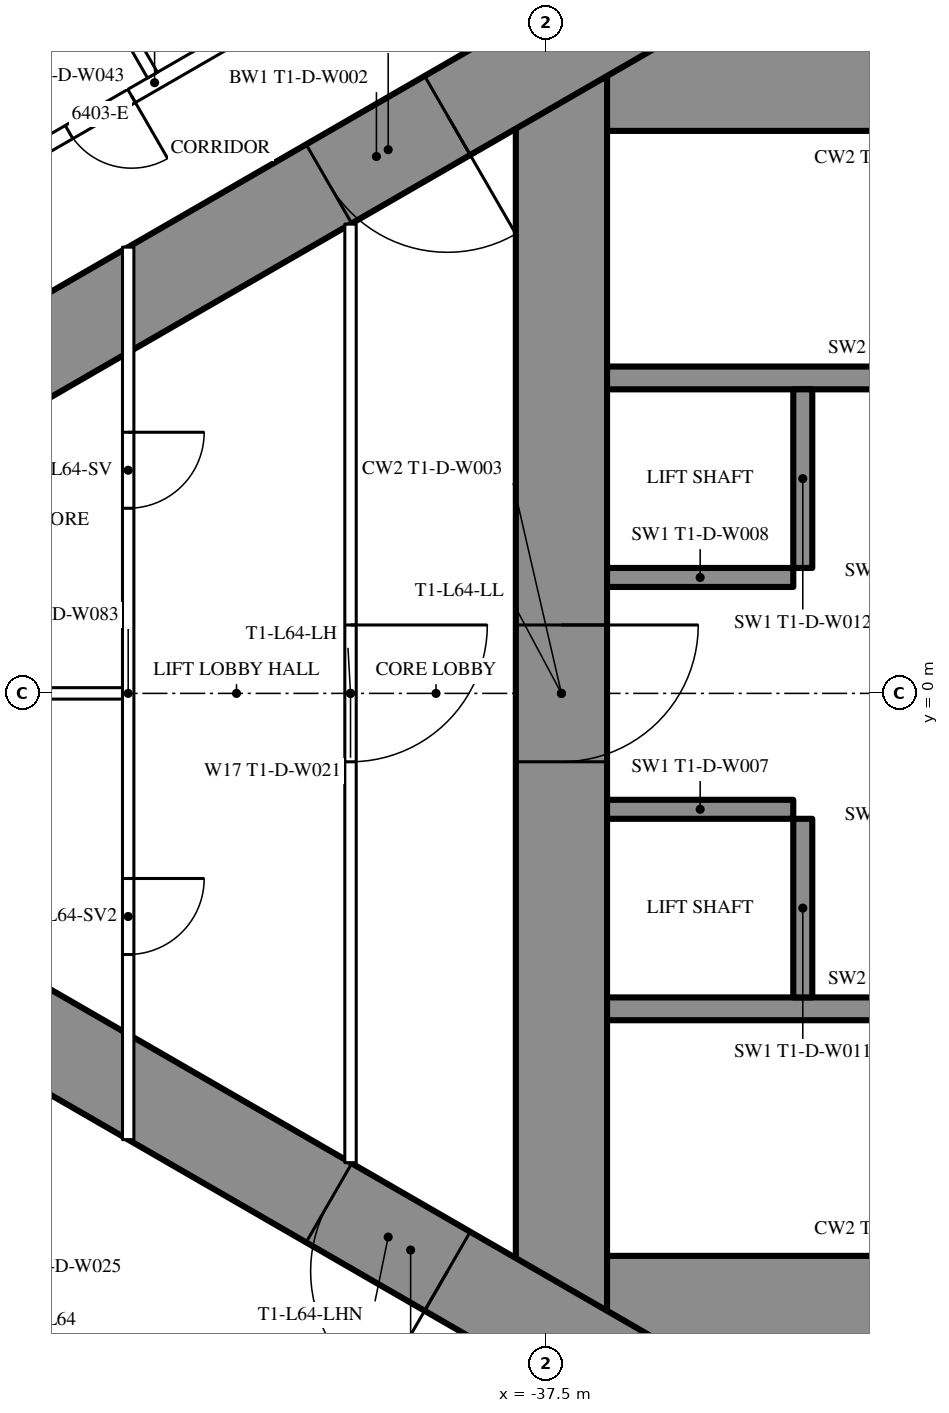
"""IFC4 building model, lengths in metres.
Left out: names, types, materials, properties, quantities, classifications, styles, units other than length and angle.
Written with IfcOpenShell. Run it as: python <this file> out.ifc"""

import sys

from ifc_helpers import new_model, si_unit, direction, frame, frame_2d, origin, place, context, subcontext, project, spatial, rectangle, extrude, element, fill, save


model = new_model("IFC4")
c1 = context("Model", 3, precision=1e-05, world=origin(), true_north=direction((0.0, 1.0)))
c2 = subcontext(c1, "Body", "Model", "MODEL_VIEW")
j1 = project(units=[si_unit("LENGTHUNIT", "METRE"), si_unit("PLANEANGLEUNIT", "RADIAN")], contexts=[c1])
p1 = place(None, origin())
s1 = spatial("IfcSite", under=j1, at=p1, CompositionType="ELEMENT")
p2 = place(p1, origin())
s2 = spatial("IfcBuilding", under=s1, at=p2, CompositionType="ELEMENT")
p3 = place(p2, frame((0.0, 0.0, 240.5)))
s3 = spatial("IfcBuildingStorey", under=s2, at=p3, CompositionType="ELEMENT", Elevation=240.5)
p4 = place(p3, frame((-37.3, 8.6, 0.0), z_axis=(0.0, 0.0, 1.0), x_axis=(0.0, -1.0, 0.0)))
e1 = element("IfcWall", 1, at=p4, inside=s3, PredefinedType="SHEAR", context=c2, shape_type="SweptSolid", body=[
    extrude(rectangle(XDim=17.2, YDim=1.2, at=frame_2d((8.6, 0.0))), origin(), (0.0, 0.0, 1.0), 3.6),
])
p5 = place(p4, frame((7.7, 0.0, 0.0)))
e2 = element("IfcOpeningElement", 2, at=p5, cuts=e1, PredefinedType="OPENING", context=c2, shape_type="SweptSolid", body=[
    extrude(rectangle(XDim=1.8, YDim=2.2, at=frame_2d((0.9, 1.1))), frame((0.0, 0.61, 0.0), z_axis=(0.0, -1.0, 0.0), x_axis=(1.0, 0.0, 0.0)), (0.0, 0.0, 1.0), 1.22),
])
p6 = place(p3, frame((-28.3, 8.0, 0.0), z_axis=(0.0, 0.0, 1.0), x_axis=(-1.0, 0.0, 0.0)))
e3 = element("IfcWall", 3, at=p6, inside=s3, PredefinedType="SHEAR", context=c2, shape_type="SweptSolid", body=[
    extrude(rectangle(XDim=8.4, YDim=1.2, at=frame_2d((4.2, 0.0))), origin(), (0.0, 0.0, 1.0), 3.6),
])
p7 = place(p6, frame((0.25, 0.0, 0.0)))
e4 = element("IfcOpeningElement", 4, at=p7, cuts=e3, PredefinedType="OPENING", context=c2, shape_type="SweptSolid", body=[
    extrude(rectangle(XDim=1.0, YDim=2.2, at=frame_2d((0.5, 1.1))), frame((0.0, 0.61, 0.0), z_axis=(0.0, -1.0, 0.0), x_axis=(1.0, 0.0, 0.0)), (0.0, 0.0, 1.0), 1.22),
])
p8 = place(p3, frame((-28.3, -8.0, 0.0), z_axis=(0.0, 0.0, 1.0), x_axis=(-1.0, 0.0, 0.0)))
e5 = element("IfcWall", 5, at=p8, inside=s3, PredefinedType="SHEAR", context=c2, shape_type="SweptSolid", body=[
    extrude(rectangle(XDim=8.4, YDim=1.2, at=frame_2d((4.2, 0.0))), origin(), (0.0, 0.0, 1.0), 3.6),
])
p9 = place(p8, frame((0.25, 0.0, 0.0)))
e6 = element("IfcOpeningElement", 6, at=p9, cuts=e5, PredefinedType="OPENING", context=c2, shape_type="SweptSolid", body=[
    extrude(rectangle(XDim=1.0, YDim=2.2, at=frame_2d((0.5, 1.1))), frame((0.0, 0.61, 0.0), z_axis=(0.0, -1.0, 0.0), x_axis=(1.0, 0.0, 0.0)), (0.0, 0.0, 1.0), 1.22),
])
for number, where, z_axis, x_axis in (
    (7, (-28.3, 4.15, 0.0), (0.0, 0.0, 1.0), (-1.0, 0.0, 0.0)),
    (8, (-28.3, -4.15, 0.0), (0.0, 0.0, 1.0), (-1.0, 0.0, 0.0)),
):
    element("IfcWall", number, at=place(p3, frame(where, z_axis=z_axis, x_axis=x_axis)), inside=s3, PredefinedType="SHEAR", context=c2, shape_type="SweptSolid", body=[
        extrude(rectangle(XDim=8.4, YDim=0.3, at=frame_2d((4.2, 0.0))), origin(), (0.0, 0.0, 1.0), 3.6),
    ])
p10 = place(p3, frame((-34.125, 4.0, 0.0), z_axis=(0.0, 0.0, 1.0), x_axis=(0.0, -1.0, 0.0)))
e9 = element("IfcWall", 9, at=p10, inside=s3, PredefinedType="SHEAR", context=c2, shape_type="SweptSolid", body=[
    extrude(rectangle(XDim=2.35, YDim=0.25, at=frame_2d((1.175, 0.0))), origin(), (0.0, 0.0, 1.0), 3.6),
])
p11 = place(p3, frame((-34.25, 1.525, 0.0), z_axis=(0.0, 0.0, 1.0), x_axis=(-1.0, 0.0, 0.0)))
e10 = element("IfcWall", 10, at=p11, inside=s3, PredefinedType="SHEAR", context=c2, shape_type="SweptSolid", body=[
    extrude(rectangle(XDim=2.45, YDim=0.25, at=frame_2d((1.225, 0.0))), origin(), (0.0, 0.0, 1.0), 3.6),
])
p12 = place(p3, frame((-34.125, -1.65, 0.0), z_axis=(0.0, 0.0, 1.0), x_axis=(0.0, -1.0, 0.0)))
e11 = element("IfcWall", 11, at=p12, inside=s3, PredefinedType="SHEAR", context=c2, shape_type="SweptSolid", body=[
    extrude(rectangle(XDim=2.35, YDim=0.25, at=frame_2d((1.175, 0.0))), origin(), (0.0, 0.0, 1.0), 3.6),
])
p13 = place(p3, frame((-34.25, -1.525, 0.0), z_axis=(0.0, 0.0, 1.0), x_axis=(-1.0, 0.0, 0.0)))
e12 = element("IfcWall", 12, at=p13, inside=s3, PredefinedType="SHEAR", context=c2, shape_type="SweptSolid", body=[
    extrude(rectangle(XDim=2.45, YDim=0.25, at=frame_2d((1.225, 0.0))), origin(), (0.0, 0.0, 1.0), 3.6),
])
p14 = place(p3, frame((-27.2, 14.3, 0.0), z_axis=(0.0, 0.0, 1.0), x_axis=(-0.866026593062, -0.499997940104, 0.0)))
e13 = element("IfcWall", 13, at=p14, inside=s3, PredefinedType="SHEAR", context=c2, shape_type="SweptSolid", body=[
    extrude(rectangle(XDim=28.946, YDim=1.2, at=frame_2d((14.473, 0.0))), origin(), (0.0, 0.0, 1.0), 3.6),
])
p15 = place(p14, frame((4.6, 0.0, 0.0)))
e14 = element("IfcOpeningElement", 14, at=p15, cuts=e13, PredefinedType="OPENING", context=c2, shape_type="SweptSolid", body=[
    extrude(rectangle(XDim=1.0, YDim=2.2, at=frame_2d((0.5, 1.1))), frame((0.0, 0.61, 0.0), z_axis=(0.0, -1.0, 0.0), x_axis=(1.0, 0.0, 0.0)), (0.0, 0.0, 1.0), 1.22),
])
p16 = place(p14, frame((13.395, 0.0, 0.0)))
e15 = element("IfcOpeningElement", 15, at=p16, cuts=e13, PredefinedType="OPENING", context=c2, shape_type="SweptSolid", body=[
    extrude(rectangle(XDim=1.8, YDim=2.2, at=frame_2d((0.9, 1.1))), frame((0.0, 0.61, 0.0), z_axis=(0.0, -1.0, 0.0), x_axis=(1.0, 0.0, 0.0)), (0.0, 0.0, 1.0), 1.22),
])
p17 = place(p3, frame((-27.2, -14.3, 0.0), z_axis=(0.0, 0.0, 1.0), x_axis=(-0.866024021859, 0.500002393557, 0.0)))
e16 = element("IfcWall", 16, at=p17, inside=s3, PredefinedType="SHEAR", context=c2, shape_type="SweptSolid", body=[
    extrude(rectangle(XDim=27.907, YDim=1.2, at=frame_2d((13.954, 0.0))), origin(), (0.0, 0.0, 1.0), 3.6),
])
p18 = place(p17, frame((4.6, 0.0, 0.0)))
e17 = element("IfcOpeningElement", 17, at=p18, cuts=e16, PredefinedType="OPENING", context=c2, shape_type="SweptSolid", body=[
    extrude(rectangle(XDim=1.0, YDim=2.2, at=frame_2d((0.5, 1.1))), frame((0.0, 0.61, 0.0), z_axis=(0.0, -1.0, 0.0), x_axis=(1.0, 0.0, 0.0)), (0.0, 0.0, 1.0), 1.22),
])
p19 = place(p17, frame((13.395, 0.0, 0.0)))
e18 = element("IfcOpeningElement", 18, at=p19, cuts=e16, PredefinedType="OPENING", context=c2, shape_type="SweptSolid", body=[
    extrude(rectangle(XDim=1.8, YDim=2.2, at=frame_2d((0.9, 1.1))), frame((0.0, 0.61, 0.0), z_axis=(0.0, -1.0, 0.0), x_axis=(1.0, 0.0, 0.0)), (0.0, 0.0, 1.0), 1.22),
])
p20 = place(p3, frame((-28.737, 16.068, 0.0), z_axis=(0.0, 0.0, 1.0), x_axis=(-0.866026057212, -0.499998868229, 0.0)))
e19 = element("IfcWall", 19, at=p20, inside=s3, PredefinedType="PARTITIONING", context=c2, shape_type="SweptSolid", body=[
    extrude(rectangle(XDim=32.137, YDim=0.2, at=frame_2d((16.068, 0.0))), origin(), (0.0, 0.0, 1.0), 3.35),
])
p21 = place(p20, frame((1.08, 0.0, 0.0)))
e20 = element("IfcOpeningElement", 20, at=p21, cuts=e19, PredefinedType="OPENING", context=c2, shape_type="SweptSolid", body=[
    extrude(rectangle(XDim=1.8, YDim=2.03, at=frame_2d((0.9, 1.015))), frame((0.0, 0.11, 0.0), z_axis=(0.0, -1.0, 0.0), x_axis=(1.0, 0.0, 0.0)), (0.0, 0.0, 1.0), 0.22),
])
p22 = place(p20, frame((6.86, 0.0, 0.0)))
e21 = element("IfcOpeningElement", 21, at=p22, cuts=e19, PredefinedType="OPENING", context=c2, shape_type="SweptSolid", body=[
    extrude(rectangle(XDim=1.0, YDim=2.2, at=frame_2d((0.5, 1.1))), frame((0.0, 0.11, 0.0), z_axis=(0.0, -1.0, 0.0), x_axis=(1.0, 0.0, 0.0)), (0.0, 0.0, 1.0), 0.22),
])
p23 = place(p20, frame((16.418, 0.0, 0.0)))
e22 = element("IfcOpeningElement", 22, at=p23, cuts=e19, PredefinedType="OPENING", context=c2, shape_type="SweptSolid", body=[
    extrude(rectangle(XDim=0.95, YDim=2.2, at=frame_2d((0.475, 1.1))), frame((0.0, 0.11, 0.0), z_axis=(0.0, -1.0, 0.0), x_axis=(1.0, 0.0, 0.0)), (0.0, 0.0, 1.0), 0.22),
])
p24 = place(p20, frame((20.567, 0.0, 0.0)))
e23 = element("IfcOpeningElement", 23, at=p24, cuts=e19, PredefinedType="OPENING", context=c2, shape_type="SweptSolid", body=[
    extrude(rectangle(XDim=0.95, YDim=2.2, at=frame_2d((0.475, 1.1))), frame((0.0, 0.11, 0.0), z_axis=(0.0, -1.0, 0.0), x_axis=(1.0, 0.0, 0.0)), (0.0, 0.0, 1.0), 0.22),
])
p25 = place(p20, frame((27.065, 0.0, 0.0)))
e24 = element("IfcOpeningElement", 24, at=p25, cuts=e19, PredefinedType="OPENING", context=c2, shape_type="SweptSolid", body=[
    extrude(rectangle(XDim=0.95, YDim=2.2, at=frame_2d((0.475, 1.1))), frame((0.0, 0.11, 0.0), z_axis=(0.0, -1.0, 0.0), x_axis=(1.0, 0.0, 0.0)), (0.0, 0.0, 1.0), 0.22),
])
p26 = place(p3, frame((-42.68, 8.134, 0.0), z_axis=(0.0, 0.0, 1.0), x_axis=(-0.499984479505, 0.866034364361, 0.0)))
e25 = element("IfcWall", 25, at=p26, inside=s3, PredefinedType="PARTITIONING", context=c2, shape_type="SweptSolid", body=[
    extrude(rectangle(XDim=5.995, YDim=0.15, at=frame_2d((2.998, 0.0))), origin(), (0.0, 0.0, 1.0), 2.45),
])
p27 = place(p3, frame((-43.445, 9.309, 0.0), z_axis=(0.0, 0.0, 1.0), x_axis=(-0.866031185235, -0.4999899861, 0.0)))
e26 = element("IfcWall", 26, at=p27, inside=s3, PredefinedType="PARTITIONING", context=c2, shape_type="SweptSolid", body=[
    extrude(rectangle(XDim=2.475, YDim=0.15, at=frame_2d((1.238, 0.0))), origin(), (0.0, 0.0, 1.0), 3.35),
])
p28 = place(p3, frame((-40.075, 6.174, 0.0), z_axis=(0.0, 0.0, 1.0), x_axis=(0.0, -1.0, 0.0)))
e27 = element("IfcWall", 27, at=p28, inside=s3, PredefinedType="PARTITIONING", context=c2, shape_type="SweptSolid", body=[
    extrude(rectangle(XDim=12.348, YDim=0.15, at=frame_2d((6.174, 0.0))), origin(), (0.0, 0.0, 1.0), 3.35),
])
p29 = place(p28, frame((5.274, 0.0, 0.0)))
e28 = element("IfcOpeningElement", 28, at=p29, cuts=e27, PredefinedType="OPENING", context=c2, shape_type="SweptSolid", body=[
    extrude(rectangle(XDim=1.8, YDim=2.2, at=frame_2d((0.9, 1.1))), frame((0.0, 0.085, 0.0), z_axis=(0.0, -1.0, 0.0), x_axis=(1.0, 0.0, 0.0)), (0.0, 0.0, 1.0), 0.17),
])
p30 = place(p3, frame((-43.0, 5.871, 0.0), z_axis=(0.0, 0.0, 1.0), x_axis=(0.0, -1.0, 0.0)))
e29 = element("IfcWall", 29, at=p30, inside=s3, PredefinedType="PARTITIONING", context=c2, shape_type="SweptSolid", body=[
    extrude(rectangle(XDim=11.741, YDim=0.15, at=frame_2d((5.871, 0.0))), origin(), (0.0, 0.0, 1.0), 3.35),
])
p31 = place(p30, frame((2.435, 0.0, 0.0)))
e30 = element("IfcOpeningElement", 30, at=p31, cuts=e29, PredefinedType="OPENING", context=c2, shape_type="SweptSolid", body=[
    extrude(rectangle(XDim=1.0, YDim=2.2, at=frame_2d((0.5, 1.1))), frame((0.0, 0.085, 0.0), z_axis=(0.0, -1.0, 0.0), x_axis=(1.0, 0.0, 0.0)), (0.0, 0.0, 1.0), 0.17),
])
p32 = place(p30, frame((8.306, 0.0, 0.0)))
e31 = element("IfcOpeningElement", 31, at=p32, cuts=e29, PredefinedType="OPENING", context=c2, shape_type="SweptSolid", body=[
    extrude(rectangle(XDim=1.0, YDim=2.2, at=frame_2d((0.5, 1.1))), frame((0.0, 0.085, 0.0), z_axis=(0.0, -1.0, 0.0), x_axis=(1.0, 0.0, 0.0)), (0.0, 0.0, 1.0), 0.17),
])
p33 = place(p3, frame((-43.075, 0.0, 0.0), z_axis=(0.0, 0.0, 1.0), x_axis=(-1.0, 0.0, 0.0)))
e32 = element("IfcWall", 32, at=p33, inside=s3, PredefinedType="PARTITIONING", context=c2, shape_type="SweptSolid", body=[
    extrude(rectangle(XDim=10.093, YDim=0.15, at=frame_2d((5.047, 0.0))), origin(), (0.0, 0.0, 1.0), 2.45),
])
p34 = place(p3, frame((-39.758, -11.697, 0.0), z_axis=(0.0, 0.0, 1.0), x_axis=(-0.866024194504, 0.500002094529, 0.0)))
e33 = element("IfcWall", 33, at=p34, inside=s3, PredefinedType="PARTITIONING", context=c2, shape_type="SweptSolid", body=[
    extrude(rectangle(XDim=6.6, YDim=0.25, at=frame_2d((3.3, 0.0))), origin(), (0.0, 0.0, 1.0), 3.35),
])
p35 = place(p34, frame((0.75, 0.0, 0.0)))
e34 = element("IfcOpeningElement", 34, at=p35, cuts=e33, PredefinedType="OPENING", context=c2, shape_type="SweptSolid", body=[
    extrude(rectangle(XDim=1.1, YDim=2.2, at=frame_2d((0.55, 1.1))), frame((0.0, 0.135, 0.0), z_axis=(0.0, -1.0, 0.0), x_axis=(1.0, 0.0, 0.0)), (0.0, 0.0, 1.0), 0.27),
])
p36 = place(p34, frame((2.75, 0.0, 0.0)))
e35 = element("IfcOpeningElement", 35, at=p36, cuts=e33, PredefinedType="OPENING", context=c2, shape_type="SweptSolid", body=[
    extrude(rectangle(XDim=1.1, YDim=2.2, at=frame_2d((0.55, 1.1))), frame((0.0, 0.135, 0.0), z_axis=(0.0, -1.0, 0.0), x_axis=(1.0, 0.0, 0.0)), (0.0, 0.0, 1.0), 0.27),
])
p37 = place(p34, frame((4.75, 0.0, 0.0)))
e36 = element("IfcOpeningElement", 36, at=p37, cuts=e33, PredefinedType="OPENING", context=c2, shape_type="SweptSolid", body=[
    extrude(rectangle(XDim=1.1, YDim=2.2, at=frame_2d((0.55, 1.1))), frame((0.0, 0.135, 0.0), z_axis=(0.0, -1.0, 0.0), x_axis=(1.0, 0.0, 0.0)), (0.0, 0.0, 1.0), 0.27),
])
p38 = place(p23, origin())
e37 = element("IfcDoor", 37, at=p38, inside=s3, OperationType="SINGLE_SWING_LEFT", PredefinedType="DOOR", context=c2, shape_type="SweptSolid", body=[
    extrude(rectangle(XDim=0.95, YDim=2.2, at=frame_2d((0.475, 1.1))), frame((0.0, 0.025, 0.0), z_axis=(0.0, -1.0, 0.0), x_axis=(1.0, 0.0, 0.0)), (0.0, 0.0, 1.0), 0.05),
])
fill(e22, e37)
p39 = place(p29, origin())
e38 = element("IfcDoor", 38, at=p39, inside=s3, OperationType="DOUBLE_DOOR_SINGLE_SWING", PredefinedType="DOOR", context=c2, shape_type="SweptSolid", body=[
    extrude(rectangle(XDim=1.8, YDim=2.2, at=frame_2d((0.9, 1.1))), frame((0.0, 0.025, 0.0), z_axis=(0.0, -1.0, 0.0), x_axis=(1.0, 0.0, 0.0)), (0.0, 0.0, 1.0), 0.05),
])
fill(e28, e38)
p40 = place(p31, origin())
e39 = element("IfcDoor", 39, at=p40, inside=s3, OperationType="SINGLE_SWING_LEFT", PredefinedType="DOOR", context=c2, shape_type="SweptSolid", body=[
    extrude(rectangle(XDim=1.0, YDim=2.2, at=frame_2d((0.5, 1.1))), frame((0.0, 0.025, 0.0), z_axis=(0.0, -1.0, 0.0), x_axis=(1.0, 0.0, 0.0)), (0.0, 0.0, 1.0), 0.05),
])
fill(e30, e39)
p41 = place(p32, origin())
e40 = element("IfcDoor", 40, at=p41, inside=s3, OperationType="SINGLE_SWING_LEFT", PredefinedType="DOOR", context=c2, shape_type="SweptSolid", body=[
    extrude(rectangle(XDim=1.0, YDim=2.2, at=frame_2d((0.5, 1.1))), frame((0.0, 0.025, 0.0), z_axis=(0.0, -1.0, 0.0), x_axis=(1.0, 0.0, 0.0)), (0.0, 0.0, 1.0), 0.05),
])
fill(e31, e40)
p42 = place(p16, origin())
e41 = element("IfcDoor", 41, at=p42, inside=s3, OperationType="DOUBLE_DOOR_SINGLE_SWING", PredefinedType="DOOR", context=c2, shape_type="SweptSolid", body=[
    extrude(rectangle(XDim=1.8, YDim=2.2, at=frame_2d((0.9, 1.1))), frame((0.0, 0.025, 0.0), z_axis=(0.0, -1.0, 0.0), x_axis=(1.0, 0.0, 0.0)), (0.0, 0.0, 1.0), 0.05),
])
fill(e15, e41)
p43 = place(p19, origin())
e42 = element("IfcDoor", 42, at=p43, inside=s3, OperationType="DOUBLE_DOOR_SINGLE_SWING", PredefinedType="DOOR", context=c2, shape_type="SweptSolid", body=[
    extrude(rectangle(XDim=1.8, YDim=2.2, at=frame_2d((0.9, 1.1))), frame((0.0, 0.025, 0.0), z_axis=(0.0, -1.0, 0.0), x_axis=(1.0, 0.0, 0.0)), (0.0, 0.0, 1.0), 0.05),
])
fill(e18, e42)
p44 = place(p5, origin())
e43 = element("IfcDoor", 43, at=p44, inside=s3, OperationType="DOUBLE_DOOR_SINGLE_SWING", PredefinedType="DOOR", context=c2, shape_type="SweptSolid", body=[
    extrude(rectangle(XDim=1.8, YDim=2.2, at=frame_2d((0.9, 1.1))), frame((0.0, 0.025, 0.0), z_axis=(0.0, -1.0, 0.0), x_axis=(1.0, 0.0, 0.0)), (0.0, 0.0, 1.0), 0.05),
])
fill(e2, e43)
save(model, sys.argv[1])
